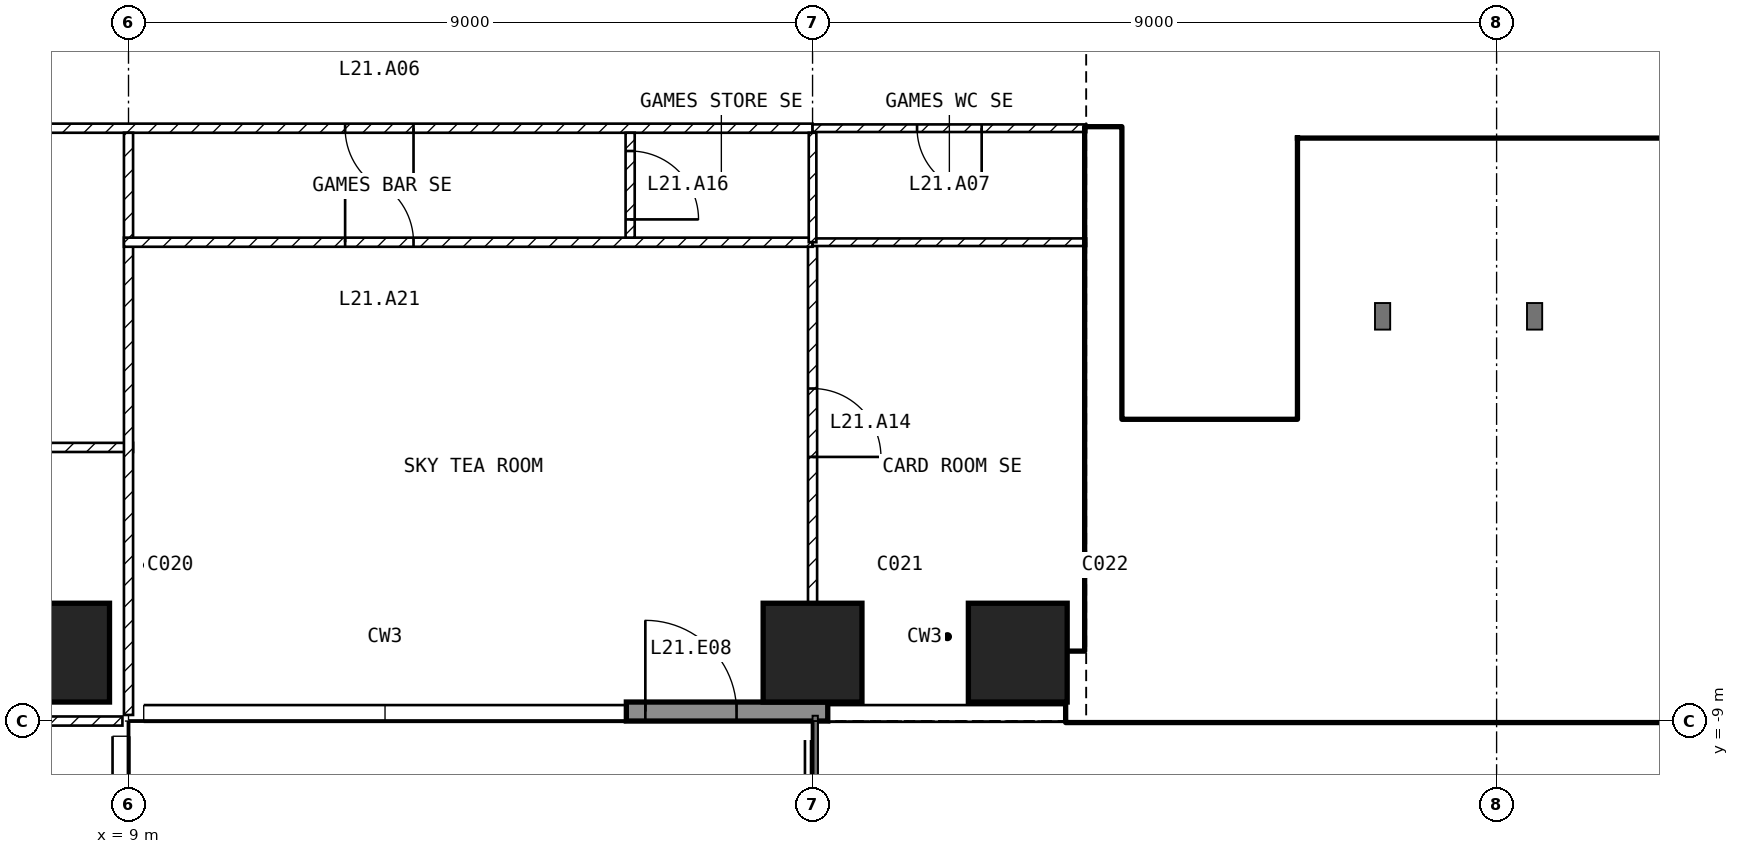
"""IFC4 building model, lengths in metres.
Left out: names, types, materials, properties, quantities, classifications, styles, units other than length and angle.
Written with IfcOpenShell. Run it as: python <this file> out.ifc"""

import sys

from ifc_helpers import new_model, si_unit, direction, frame, frame_2d, origin, origin_2d, place, context, subcontext, project, spatial, rectangle, extrude, element, fill, save


model = new_model("IFC4")
c1 = context("Model", 3, precision=1e-05, world=origin(), true_north=direction((0.0, 1.0)))
c2 = subcontext(c1, "Body", "Model", "MODEL_VIEW")
j1 = project(units=[si_unit("LENGTHUNIT", "METRE"), si_unit("PLANEANGLEUNIT", "RADIAN")], contexts=[c1])
p1 = place(None, origin())
s1 = spatial("IfcSite", under=j1, at=p1, CompositionType="ELEMENT")
p2 = place(p1, origin())
s2 = spatial("IfcBuilding", under=s1, at=p2, CompositionType="ELEMENT")
p3 = place(p2, frame((0.0, 0.0, 92.5)))
s3 = spatial("IfcBuildingStorey", under=s2, at=p3, CompositionType="ELEMENT", Elevation=92.5)
for number, where, z_axis, x_axis in (
    (1, (8.1, -8.1, -0.3), (0.0, 0.0, 1.0), (1.0, 0.0, 0.0)),
    (2, (18.0, -8.1, -0.3), (0.0, 0.0, 1.0), (1.0, 0.0, 0.0)),
    (3, (20.7, -8.1, -0.3), (0.0, 0.0, 1.0), (1.0, 0.0, 0.0)),
):
    element("IfcColumn", number, at=place(p3, frame(where, z_axis=z_axis, x_axis=x_axis)), inside=s3, PredefinedType="COLUMN", context=c2, shape_type="SweptSolid", body=[
        extrude(rectangle(XDim=1.3, YDim=1.3, at=origin_2d()), origin(), (0.0, 0.0, 1.0), 5.25),
    ])
p4 = place(p3, frame((15.55, -8.875, 0.0), z_axis=(0.0, 0.0, 1.0), x_axis=(1.0, 0.0, 0.0)))
e4 = element("IfcWall", 4, at=p4, inside=s3, PredefinedType="SOLIDWALL", context=c2, shape_type="SweptSolid", body=[
    extrude(rectangle(XDim=2.65, YDim=0.25, at=frame_2d((1.325, 0.0))), origin(), (0.0, 0.0, 1.0), 4.95),
])
p5 = place(p4, frame((0.25, 0.0, 0.0)))
e5 = element("IfcOpeningElement", 5, at=p5, cuts=e4, PredefinedType="OPENING", context=c2, shape_type="SweptSolid", body=[
    extrude(rectangle(XDim=1.2, YDim=2.4, at=frame_2d((0.6, 1.2))), frame((0.0, 0.135, 0.0), z_axis=(0.0, -1.0, 0.0), x_axis=(1.0, 0.0, 0.0)), (0.0, 0.0, 1.0), 0.27),
])
p6 = place(p3, frame((21.35, -8.55, 0.0), z_axis=(0.0, 0.0, 1.0), x_axis=(1.0, 0.0, 0.0)))
e6 = element("IfcWall", 6, at=p6, inside=s3, PredefinedType="SHEAR", context=c2, shape_type="SweptSolid", body=[
    extrude(rectangle(XDim=11.05, YDim=0.9, at=frame_2d((5.525, 0.0))), origin(), (0.0, 0.0, 1.0), 4.95),
])
p7 = place(p3, frame((21.825, -8.1, 0.0), z_axis=(0.0, 0.0, 1.0), x_axis=(0.0, 1.0, 0.0)))
e7 = element("IfcWall", 7, at=p7, inside=s3, PredefinedType="SHEAR", context=c2, shape_type="SweptSolid", body=[
    extrude(rectangle(XDim=6.9, YDim=0.45, at=frame_2d((3.45, 0.0))), origin(), (0.0, 0.0, 1.0), 4.95),
])
p8 = place(p3, frame((24.5, -5.05, 0.0), z_axis=(0.0, 0.0, 1.0), x_axis=(0.0, 1.0, 0.0)))
e8 = element("IfcWall", 8, at=p8, inside=s3, PredefinedType="SOLIDWALL", context=c2, shape_type="SweptSolid", body=[
    extrude(rectangle(XDim=3.7, YDim=0.2, at=frame_2d((1.85, 0.0))), origin(), (0.0, 0.0, 1.0), 4.95),
])
p9 = place(p8, frame((0.1, 0.0, 0.0)))
e9 = element("IfcOpeningElement", 9, at=p9, cuts=e8, PredefinedType="OPENING", context=c2, shape_type="SweptSolid", body=[
    extrude(rectangle(XDim=0.8, YDim=2.1, at=frame_2d((0.4, 1.05))), frame((0.0, 0.11, 0.0), z_axis=(0.0, -1.0, 0.0), x_axis=(1.0, 0.0, 0.0)), (0.0, 0.0, 1.0), 0.22),
])
p10 = place(p3, frame((22.05, -5.15, 0.0), z_axis=(0.0, 0.0, 1.0), x_axis=(1.0, 0.0, 0.0)))
e10 = element("IfcWall", 10, at=p10, inside=s3, PredefinedType="SOLIDWALL", context=c2, shape_type="SweptSolid", body=[
    extrude(rectangle(XDim=6.3, YDim=0.2, at=frame_2d((3.15, 0.0))), origin(), (0.0, 0.0, 1.0), 4.95),
])
p11 = place(p10, frame((0.2, 0.0, 0.0)))
e11 = element("IfcOpeningElement", 11, at=p11, cuts=e10, PredefinedType="OPENING", context=c2, shape_type="SweptSolid", body=[
    extrude(rectangle(XDim=1.0, YDim=2.1, at=frame_2d((0.5, 1.05))), frame((0.0, 0.11, 0.0), z_axis=(0.0, -1.0, 0.0), x_axis=(1.0, 0.0, 0.0)), (0.0, 0.0, 1.0), 0.22),
])
p12 = place(p3, frame((28.25, -8.1, 0.0), z_axis=(0.0, 0.0, 1.0), x_axis=(0.0, 1.0, 0.0)))
e12 = element("IfcWall", 12, at=p12, inside=s3, PredefinedType="SOLIDWALL", context=c2, shape_type="SweptSolid", body=[
    extrude(rectangle(XDim=2.85, YDim=0.2, at=frame_2d((1.425, 0.0))), origin(), (0.0, 0.0, 1.0), 4.95),
])
p13 = place(p3, frame((24.6, -1.45, 0.0), z_axis=(0.0, 0.0, 1.0), x_axis=(1.0, 0.0, 0.0)))
e13 = element("IfcWall", 13, at=p13, inside=s3, PredefinedType="SOLIDWALL", context=c2, shape_type="SweptSolid", body=[
    extrude(rectangle(XDim=10.5, YDim=0.2, at=frame_2d((5.25, 0.0))), origin(), (0.0, 0.0, 1.0), 4.95),
])
p14 = place(p13, frame((0.4, 0.0, 0.0)))
e14 = element("IfcOpeningElement", 14, at=p14, cuts=e13, PredefinedType="OPENING", context=c2, shape_type="SweptSolid", body=[
    extrude(rectangle(XDim=1.0, YDim=2.1, at=frame_2d((0.5, 1.05))), frame((0.0, 0.11, 0.0), z_axis=(0.0, -1.0, 0.0), x_axis=(1.0, 0.0, 0.0)), (0.0, 0.0, 1.0), 0.22),
])
p15 = place(p13, frame((2.4, 0.0, 0.0)))
e15 = element("IfcOpeningElement", 15, at=p15, cuts=e13, PredefinedType="OPENING", context=c2, shape_type="SweptSolid", body=[
    extrude(rectangle(XDim=1.0, YDim=2.1, at=frame_2d((0.5, 1.05))), frame((0.0, 0.11, 0.0), z_axis=(0.0, -1.0, 0.0), x_axis=(1.0, 0.0, 0.0)), (0.0, 0.0, 1.0), 0.22),
])
p16 = place(p13, frame((4.4, 0.0, 0.0)))
e16 = element("IfcOpeningElement", 16, at=p16, cuts=e13, PredefinedType="OPENING", context=c2, shape_type="SweptSolid", body=[
    extrude(rectangle(XDim=1.0, YDim=2.1, at=frame_2d((0.5, 1.05))), frame((0.0, 0.11, 0.0), z_axis=(0.0, -1.0, 0.0), x_axis=(1.0, 0.0, 0.0)), (0.0, 0.0, 1.0), 0.22),
])
p17 = place(p13, frame((6.2, 0.0, 0.0)))
e17 = element("IfcOpeningElement", 17, at=p17, cuts=e13, PredefinedType="OPENING", context=c2, shape_type="SweptSolid", body=[
    extrude(rectangle(XDim=1.0, YDim=2.1, at=frame_2d((0.5, 1.05))), frame((0.0, 0.11, 0.0), z_axis=(0.0, -1.0, 0.0), x_axis=(1.0, 0.0, 0.0)), (0.0, 0.0, 1.0), 0.22),
])
p18 = place(p13, frame((7.75, 0.0, 0.0)))
e18 = element("IfcOpeningElement", 18, at=p18, cuts=e13, PredefinedType="OPENING", context=c2, shape_type="SweptSolid", body=[
    extrude(rectangle(XDim=1.0, YDim=2.1, at=frame_2d((0.5, 1.05))), frame((0.0, 0.11, 0.0), z_axis=(0.0, -1.0, 0.0), x_axis=(1.0, 0.0, 0.0)), (0.0, 0.0, 1.0), 0.22),
])
p19 = place(p13, frame((9.3, 0.0, 0.0)))
e19 = element("IfcOpeningElement", 19, at=p19, cuts=e13, PredefinedType="OPENING", context=c2, shape_type="SweptSolid", body=[
    extrude(rectangle(XDim=1.0, YDim=2.1, at=frame_2d((0.5, 1.05))), frame((0.0, 0.11, 0.0), z_axis=(0.0, -1.0, 0.0), x_axis=(1.0, 0.0, 0.0)), (0.0, 0.0, 1.0), 0.22),
])
p20 = place(p3, frame((24.6, -3.95, 0.0), z_axis=(0.0, 0.0, 1.0), x_axis=(1.0, 0.0, 0.0)))
e20 = element("IfcWall", 20, at=p20, inside=s3, PredefinedType="SOLIDWALL", context=c2, shape_type="SweptSolid", body=[
    extrude(rectangle(XDim=10.5, YDim=0.2, at=frame_2d((5.25, 0.0))), origin(), (0.0, 0.0, 1.0), 4.95),
])
for number, where, z_axis, x_axis in (
    (21, (26.5, -3.85, 0.0), (0.0, 0.0, 1.0), (0.0, 1.0, 0.0)),
    (22, (28.5, -3.85, 0.0), (0.0, 0.0, 1.0), (0.0, 1.0, 0.0)),
):
    element("IfcWall", number, at=place(p3, frame(where, z_axis=z_axis, x_axis=x_axis)), inside=s3, PredefinedType="SOLIDWALL", context=c2, shape_type="SweptSolid", body=[
        extrude(rectangle(XDim=2.3, YDim=0.2, at=frame_2d((1.15, 0.0))), origin(), (0.0, 0.0, 1.0), 4.95),
    ])
p21 = place(p3, frame((18.0, -1.2, 0.0), z_axis=(0.0, 0.0, 1.0), x_axis=(-1.0, 0.0, 0.0)))
e23 = element("IfcWall", 23, at=p21, inside=s3, PredefinedType="PARTITIONING", context=c2, shape_type="SweptSolid", body=[
    extrude(rectangle(XDim=36.0, YDim=0.12, at=frame_2d((18.0, 0.0))), origin(), (0.0, 0.0, 1.0), 4.95),
])
p22 = place(p21, frame((17.1, 0.0, 0.0)))
e24 = element("IfcOpeningElement", 24, at=p22, cuts=e23, PredefinedType="OPENING", context=c2, shape_type="SweptSolid", body=[
    extrude(rectangle(XDim=1.8, YDim=2.1, at=frame_2d((0.9, 1.05))), frame((0.0, 0.07, 0.0), z_axis=(0.0, -1.0, 0.0), x_axis=(1.0, 0.0, 0.0)), (0.0, 0.0, 1.0), 0.14),
])
p23 = place(p21, frame((5.25, 0.0, 0.0)))
e25 = element("IfcOpeningElement", 25, at=p23, cuts=e23, PredefinedType="OPENING", context=c2, shape_type="SweptSolid", body=[
    extrude(rectangle(XDim=0.9, YDim=2.1, at=frame_2d((0.45, 1.05))), frame((0.0, 0.07, 0.0), z_axis=(0.0, -1.0, 0.0), x_axis=(1.0, 0.0, 0.0)), (0.0, 0.0, 1.0), 0.14),
])
p24 = place(p21, frame((34.05, 0.0, 0.0)))
e26 = element("IfcOpeningElement", 26, at=p24, cuts=e23, PredefinedType="OPENING", context=c2, shape_type="SweptSolid", body=[
    extrude(rectangle(XDim=0.9, YDim=2.1, at=frame_2d((0.45, 1.05))), frame((0.0, 0.07, 0.0), z_axis=(0.0, -1.0, 0.0), x_axis=(1.0, 0.0, 0.0)), (0.0, 0.0, 1.0), 0.14),
])
p25 = place(p3, frame((21.6, -1.2, 0.0), z_axis=(0.0, 0.0, 1.0), x_axis=(-1.0, 0.0, 0.0)))
e27 = element("IfcWall", 27, at=p25, inside=s3, PredefinedType="PARTITIONING", context=c2, shape_type="SweptSolid", body=[
    extrude(rectangle(XDim=3.6, YDim=0.1, at=frame_2d((1.8, 0.0))), origin(), (0.0, 0.0, 1.0), 4.95),
])
p26 = place(p25, frame((1.375, 0.0, 0.0)))
e28 = element("IfcOpeningElement", 28, at=p26, cuts=e27, PredefinedType="OPENING", context=c2, shape_type="SweptSolid", body=[
    extrude(rectangle(XDim=0.85, YDim=2.1, at=frame_2d((0.425, 1.05))), frame((0.0, 0.06, 0.0), z_axis=(0.0, -1.0, 0.0), x_axis=(1.0, 0.0, 0.0)), (0.0, 0.0, 1.0), 0.12),
])
p27 = place(p3, frame((-9.06, -5.4, 0.0), z_axis=(0.0, 0.0, 1.0), x_axis=(1.0, 0.0, 0.0)))
e29 = element("IfcWall", 29, at=p27, inside=s3, PredefinedType="PARTITIONING", context=c2, shape_type="SweptSolid", body=[
    extrude(rectangle(XDim=18.12, YDim=0.12, at=frame_2d((9.06, 0.0))), origin(), (0.0, 0.0, 1.0), 4.95),
])
p28 = place(p27, frame((8.61, 0.0, 0.0)))
e30 = element("IfcOpeningElement", 30, at=p28, cuts=e29, PredefinedType="OPENING", context=c2, shape_type="SweptSolid", body=[
    extrude(rectangle(XDim=0.9, YDim=2.1, at=frame_2d((0.45, 1.05))), frame((0.0, 0.07, 0.0), z_axis=(0.0, -1.0, 0.0), x_axis=(1.0, 0.0, 0.0)), (0.0, 0.0, 1.0), 0.14),
])
p29 = place(p3, frame((9.0, -1.26, 0.0), z_axis=(0.0, 0.0, 1.0), x_axis=(0.0, -1.0, 0.0)))
e31 = element("IfcWall", 31, at=p29, inside=s3, PredefinedType="PARTITIONING", context=c2, shape_type="SweptSolid", body=[
    extrude(rectangle(XDim=7.66, YDim=0.12, at=frame_2d((3.83, 0.0))), origin(), (0.0, 0.0, 1.0), 4.95),
])
p30 = place(p3, frame((8.92, -9.0, 0.0), z_axis=(0.0, 0.0, 1.0), x_axis=(-1.0, 0.0, 0.0)))
e32 = element("IfcWall", 32, at=p30, inside=s3, PredefinedType="PARTITIONING", context=c2, shape_type="SweptSolid", body=[
    extrude(rectangle(XDim=4.42, YDim=0.12, at=frame_2d((2.21, 0.0))), origin(), (0.0, 0.0, 1.0), 4.95),
])
p31 = place(p3, frame((18.0, -2.7, 0.0), z_axis=(0.0, 0.0, 1.0), x_axis=(0.0, -1.0, 0.0)))
e33 = element("IfcWall", 33, at=p31, inside=s3, PredefinedType="PARTITIONING", context=c2, shape_type="SweptSolid", body=[
    extrude(rectangle(XDim=4.75, YDim=0.12, at=frame_2d((2.375, 0.0))), origin(), (0.0, 0.0, 1.0), 4.046),
])
p32 = place(p31, frame((1.925, 0.0, 0.0)))
e34 = element("IfcOpeningElement", 34, at=p32, cuts=e33, PredefinedType="OPENING", context=c2, shape_type="SweptSolid", body=[
    extrude(rectangle(XDim=0.9, YDim=2.1, at=frame_2d((0.45, 1.05))), frame((0.0, 0.07, 0.0), z_axis=(0.0, -1.0, 0.0), x_axis=(1.0, 0.0, 0.0)), (0.0, 0.0, 1.0), 0.14),
])
p33 = place(p3, frame((8.94, -2.7, 0.0), z_axis=(0.0, 0.0, 1.0), x_axis=(1.0, 0.0, 0.0)))
e35 = element("IfcWall", 35, at=p33, inside=s3, PredefinedType="PARTITIONING", context=c2, shape_type="SweptSolid", body=[
    extrude(rectangle(XDim=9.06, YDim=0.12, at=frame_2d((4.53, 0.0))), origin(), (0.0, 0.0, 1.0), 4.95),
])
p34 = place(p33, frame((2.91, 0.0, 0.0)))
e36 = element("IfcOpeningElement", 36, at=p34, cuts=e35, PredefinedType="OPENING", context=c2, shape_type="SweptSolid", body=[
    extrude(rectangle(XDim=0.9, YDim=2.1, at=frame_2d((0.45, 1.05))), frame((0.0, 0.07, 0.0), z_axis=(0.0, -1.0, 0.0), x_axis=(1.0, 0.0, 0.0)), (0.0, 0.0, 1.0), 0.14),
])
p35 = place(p3, frame((18.0, -2.7, 0.0), z_axis=(0.0, 0.0, 1.0), x_axis=(1.0, 0.0, 0.0)))
e37 = element("IfcWall", 37, at=p35, inside=s3, PredefinedType="PARTITIONING", context=c2, shape_type="SweptSolid", body=[
    extrude(rectangle(XDim=3.6, YDim=0.1, at=frame_2d((1.8, 0.0))), origin(), (0.0, 0.0, 1.0), 4.95),
])
p36 = place(p3, frame((15.6, -1.26, 0.0), z_axis=(0.0, 0.0, 1.0), x_axis=(0.0, -1.0, 0.0)))
e38 = element("IfcWall", 38, at=p36, inside=s3, PredefinedType="PARTITIONING", context=c2, shape_type="SweptSolid", body=[
    extrude(rectangle(XDim=1.38, YDim=0.12, at=frame_2d((0.69, 0.0))), origin(), (0.0, 0.0, 1.0), 4.95),
])
p37 = place(p36, frame((0.24, 0.0, 0.0)))
e39 = element("IfcOpeningElement", 39, at=p37, cuts=e38, PredefinedType="OPENING", context=c2, shape_type="SweptSolid", body=[
    extrude(rectangle(XDim=0.9, YDim=2.1, at=frame_2d((0.45, 1.05))), frame((0.0, 0.07, 0.0), z_axis=(0.0, -1.0, 0.0), x_axis=(1.0, 0.0, 0.0)), (0.0, 0.0, 1.0), 0.14),
])
p38 = place(p3, frame((18.0, -1.26, 0.0), z_axis=(0.0, 0.0, 1.0), x_axis=(0.0, -1.0, 0.0)))
e40 = element("IfcWall", 40, at=p38, inside=s3, PredefinedType="PARTITIONING", context=c2, shape_type="SweptSolid", body=[
    extrude(rectangle(XDim=1.44, YDim=0.1, at=frame_2d((0.72, 0.0))), origin(), (0.0, 0.0, 1.0), 4.046),
])
p39 = place(p5, origin())
e41 = element("IfcDoor", 41, at=p39, inside=s3, OperationType="SINGLE_SWING_LEFT", PredefinedType="DOOR", context=c2, shape_type="SweptSolid", body=[
    extrude(rectangle(XDim=1.2, YDim=2.4, at=frame_2d((0.6, 1.2))), frame((0.0, 0.025, 0.0), z_axis=(0.0, -1.0, 0.0), x_axis=(1.0, 0.0, 0.0)), (0.0, 0.0, 1.0), 0.05),
])
fill(e5, e41)
p40 = place(p14, origin())
e42 = element("IfcDoor", 42, at=p40, inside=s3, OperationType="DOUBLE_DOOR_SLIDING", PredefinedType="DOOR", context=c2, shape_type="SweptSolid", body=[
    extrude(rectangle(XDim=1.0, YDim=2.1, at=frame_2d((0.5, 1.05))), frame((0.0, 0.025, 0.0), z_axis=(0.0, -1.0, 0.0), x_axis=(1.0, 0.0, 0.0)), (0.0, 0.0, 1.0), 0.05),
])
fill(e14, e42)
p41 = place(p15, origin())
e43 = element("IfcDoor", 43, at=p41, inside=s3, OperationType="DOUBLE_DOOR_SLIDING", PredefinedType="DOOR", context=c2, shape_type="SweptSolid", body=[
    extrude(rectangle(XDim=1.0, YDim=2.1, at=frame_2d((0.5, 1.05))), frame((0.0, 0.025, 0.0), z_axis=(0.0, -1.0, 0.0), x_axis=(1.0, 0.0, 0.0)), (0.0, 0.0, 1.0), 0.05),
])
fill(e15, e43)
p42 = place(p16, origin())
e44 = element("IfcDoor", 44, at=p42, inside=s3, OperationType="DOUBLE_DOOR_SLIDING", PredefinedType="DOOR", context=c2, shape_type="SweptSolid", body=[
    extrude(rectangle(XDim=1.0, YDim=2.1, at=frame_2d((0.5, 1.05))), frame((0.0, 0.025, 0.0), z_axis=(0.0, -1.0, 0.0), x_axis=(1.0, 0.0, 0.0)), (0.0, 0.0, 1.0), 0.05),
])
fill(e16, e44)
p43 = place(p11, origin())
e45 = element("IfcDoor", 45, at=p43, inside=s3, OperationType="SINGLE_SWING_LEFT", PredefinedType="DOOR", context=c2, shape_type="SweptSolid", body=[
    extrude(rectangle(XDim=1.0, YDim=2.1, at=frame_2d((0.5, 1.05))), frame((0.0, 0.025, 0.0), z_axis=(0.0, -1.0, 0.0), x_axis=(1.0, 0.0, 0.0)), (0.0, 0.0, 1.0), 0.05),
])
fill(e11, e45)
p44 = place(p9, origin())
e46 = element("IfcDoor", 46, at=p44, inside=s3, OperationType="SINGLE_SWING_LEFT", PredefinedType="DOOR", context=c2, shape_type="SweptSolid", body=[
    extrude(rectangle(XDim=0.8, YDim=2.1, at=frame_2d((0.4, 1.05))), frame((0.0, 0.025, 0.0), z_axis=(0.0, -1.0, 0.0), x_axis=(1.0, 0.0, 0.0)), (0.0, 0.0, 1.0), 0.05),
])
fill(e9, e46)
p45 = place(p23, origin())
e47 = element("IfcDoor", 47, at=p45, inside=s3, OperationType="SINGLE_SWING_LEFT", PredefinedType="DOOR", context=c2, shape_type="SweptSolid", body=[
    extrude(rectangle(XDim=0.9, YDim=2.1, at=frame_2d((0.45, 1.05))), frame((0.0, 0.025, 0.0), z_axis=(0.0, -1.0, 0.0), x_axis=(1.0, 0.0, 0.0)), (0.0, 0.0, 1.0), 0.05),
])
fill(e25, e47)
p46 = place(p26, origin())
e48 = element("IfcDoor", 48, at=p46, inside=s3, OperationType="SINGLE_SWING_LEFT", PredefinedType="DOOR", context=c2, shape_type="SweptSolid", body=[
    extrude(rectangle(XDim=0.85, YDim=2.1, at=frame_2d((0.425, 1.05))), frame((0.0, 0.025, 0.0), z_axis=(0.0, -1.0, 0.0), x_axis=(1.0, 0.0, 0.0)), (0.0, 0.0, 1.0), 0.05),
])
fill(e28, e48)
p47 = place(p32, origin())
e49 = element("IfcDoor", 49, at=p47, inside=s3, OperationType="SINGLE_SWING_RIGHT", PredefinedType="DOOR", context=c2, shape_type="SweptSolid", body=[
    extrude(rectangle(XDim=0.9, YDim=2.1, at=frame_2d((0.45, 1.05))), frame((0.0, 0.025, 0.0), z_axis=(0.0, -1.0, 0.0), x_axis=(1.0, 0.0, 0.0)), (0.0, 0.0, 1.0), 0.05),
])
fill(e34, e49)
p48 = place(p37, origin())
e50 = element("IfcDoor", 50, at=p48, inside=s3, OperationType="SINGLE_SWING_RIGHT", PredefinedType="DOOR", context=c2, shape_type="SweptSolid", body=[
    extrude(rectangle(XDim=0.9, YDim=2.1, at=frame_2d((0.45, 1.05))), frame((0.0, 0.025, 0.0), z_axis=(0.0, -1.0, 0.0), x_axis=(1.0, 0.0, 0.0)), (0.0, 0.0, 1.0), 0.05),
])
fill(e39, e50)
p49 = place(p34, origin())
e51 = element("IfcDoor", 51, at=p49, inside=s3, OperationType="SINGLE_SWING_LEFT", PredefinedType="DOOR", context=c2, shape_type="SweptSolid", body=[
    extrude(rectangle(XDim=0.9, YDim=2.1, at=frame_2d((0.45, 1.05))), frame((0.0, 0.025, 0.0), z_axis=(0.0, -1.0, 0.0), x_axis=(1.0, 0.0, 0.0)), (0.0, 0.0, 1.0), 0.05),
])
fill(e36, e51)
save(model, sys.argv[1])
